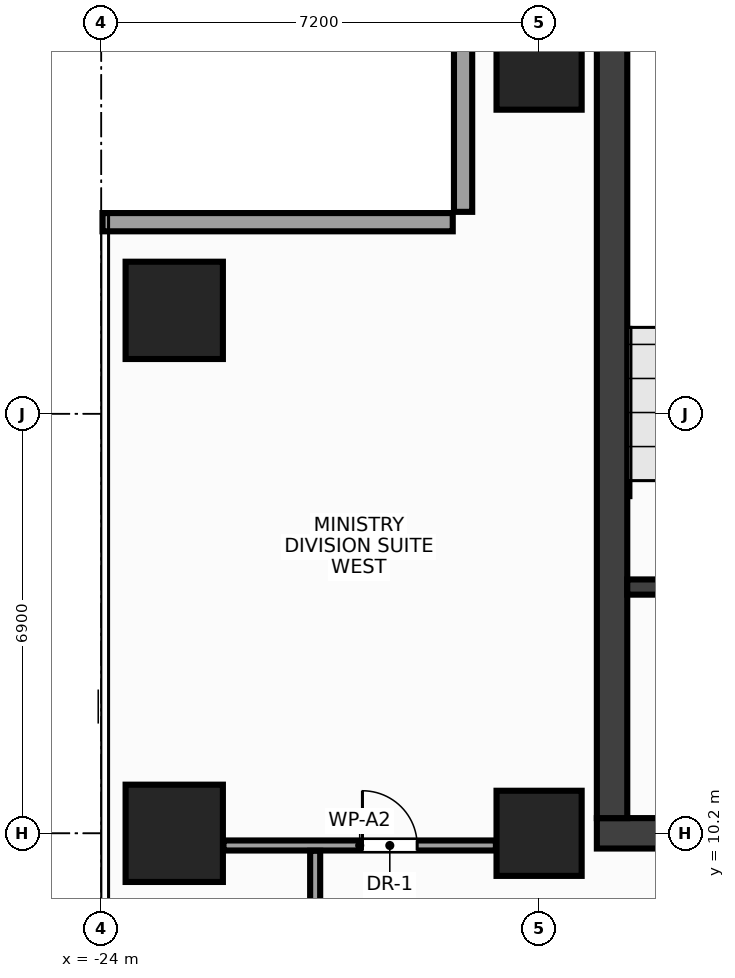
"""IFC4 building model, lengths in metres.
Left out: names, types, materials, properties, quantities, classifications, styles, units other than length and angle.
Written with IfcOpenShell. Run it as: python <this file> out.ifc"""

import sys

from ifc_helpers import new_model, si_unit, direction, frame, frame_2d, origin, origin_2d, place, context, subcontext, project, spatial, rectangle, extrude, source, transform, mapped, element, fill, save


model = new_model("IFC4")
c1 = context("Model", 3, precision=1e-05, world=origin(), true_north=direction((0.0, 1.0)))
c2 = subcontext(c1, "Body", "Model", "MODEL_VIEW")
j1 = project(units=[si_unit("LENGTHUNIT", "METRE"), si_unit("PLANEANGLEUNIT", "RADIAN")], contexts=[c1])
p1 = place(None, origin())
s1 = spatial("IfcSite", under=j1, at=p1, CompositionType="ELEMENT")
p2 = place(p1, origin())
s2 = spatial("IfcBuilding", under=s1, at=p2, CompositionType="ELEMENT")
p3 = place(p2, frame((0.0, 0.0, 221.6)))
s3 = spatial("IfcBuildingStorey", under=s2, at=p3, CompositionType="ELEMENT", Elevation=221.6)
m1 = source(origin(), c2, "Body", "SweptSolid", [
    extrude(rectangle(XDim=31.7, YDim=0.5, at=frame_2d((15.85, 0.0))), origin(), (0.0, 0.0, 1.0), 3.6),
])
p4 = place(p3, frame((-15.85, 10.2, 0.0), z_axis=(0.0, 0.0, 1.0), x_axis=(1.0, 0.0, 0.0)))
e1 = element("IfcWall", 1, at=p4, inside=s3, PredefinedType="SHEAR", context=c2, shape_type="MappedRepresentation", body=[
    mapped(m1, transform((0.0, 0.0, 0.0), x_axis=(1.0, 0.0, 0.0), y_axis=(0.0, 1.0, 0.0), z_axis=(0.0, 0.0, 1.0), scale=1.0)),
])
p5 = place(p4, frame((1.7, 0.0, 0.0)))
e2 = element("IfcOpeningElement", 2, at=p5, cuts=e1, PredefinedType="OPENING", context=c2, shape_type="SweptSolid", body=[
    extrude(rectangle(XDim=1.6, YDim=2.15, at=frame_2d((0.8, 1.075))), frame((0.0, 0.262, 0.0), z_axis=(0.0, -1.0, 0.0), x_axis=(1.0, 0.0, 0.0)), (0.0, 0.0, 1.0), 0.524),
])
p6 = place(p4, frame((28.4, 0.0, 0.0)))
e3 = element("IfcOpeningElement", 3, at=p6, cuts=e1, PredefinedType="OPENING", context=c2, shape_type="SweptSolid", body=[
    extrude(rectangle(XDim=1.6, YDim=2.15, at=frame_2d((0.8, 1.075))), frame((0.0, 0.262, 0.0), z_axis=(0.0, -1.0, 0.0), x_axis=(1.0, 0.0, 0.0)), (0.0, 0.0, 1.0), 0.524),
])
p7 = place(p4, frame((15.1, 0.0, 0.0)))
e4 = element("IfcOpeningElement", 4, at=p7, cuts=e1, PredefinedType="OPENING", context=c2, shape_type="SweptSolid", body=[
    extrude(rectangle(XDim=1.5, YDim=2.2, at=frame_2d((0.75, 1.1))), frame((0.0, 0.262, 0.0), z_axis=(0.0, -1.0, 0.0), x_axis=(1.0, 0.0, 0.0)), (0.0, 0.0, 1.0), 0.524),
])
m2 = source(origin(), c2, "Body", "SweptSolid", [
    extrude(rectangle(XDim=13.1, YDim=0.5, at=frame_2d((6.55, 0.0))), origin(), (0.0, 0.0, 1.0), 3.6),
])
p8 = place(p3, frame((-15.6, 10.45, 0.0), z_axis=(0.0, 0.0, 1.0), x_axis=(0.0, 1.0, 0.0)))
e5 = element("IfcWall", 5, at=p8, inside=s3, PredefinedType="SHEAR", context=c2, shape_type="MappedRepresentation", body=[
    mapped(m2, transform((0.0, 0.0, 0.0), x_axis=(1.0, 0.0, 0.0), y_axis=(0.0, 1.0, 0.0), z_axis=(0.0, 0.0, 1.0), scale=1.0)),
])
m3 = source(origin(), c2, "Body", "SweptSolid", [
    extrude(rectangle(XDim=3.705, YDim=0.25, at=frame_2d((1.853, 0.0))), origin(), (0.0, 0.0, 1.0), 3.6),
])
p9 = place(p3, frame((-15.35, 14.25, 0.0), z_axis=(0.0, 0.0, 1.0), x_axis=(1.0, 0.0, 0.0)))
e6 = element("IfcWall", 6, at=p9, inside=s3, PredefinedType="SHEAR", context=c2, shape_type="MappedRepresentation", body=[
    mapped(m3, transform((0.0, 0.0, 0.0), x_axis=(1.0, 0.0, 0.0), y_axis=(0.0, 1.0, 0.0), z_axis=(0.0, 0.0, 1.0), scale=1.0)),
])
p10 = place(p9, frame((0.95, 0.0, 0.0)))
e7 = element("IfcOpeningElement", 7, at=p10, cuts=e6, PredefinedType="OPENING", context=c2, shape_type="SweptSolid", body=[
    extrude(rectangle(XDim=1.6, YDim=2.15, at=frame_2d((0.8, 1.075))), frame((0.0, 0.137, 0.0), z_axis=(0.0, -1.0, 0.0), x_axis=(1.0, 0.0, 0.0)), (0.0, 0.0, 1.0), 0.274),
])
m4 = source(origin(), c2, "Body", "SweptSolid", [
    extrude(rectangle(XDim=1.4, YDim=1.4, at=origin_2d()), origin(), (0.0, 0.0, 1.0), 3.6),
])
for number, where, z_axis, x_axis in (
    (8, (-16.8, 10.2, 0.0), (0.0, 0.0, 1.0), (1.0, 0.0, 0.0)),
    (9, (-16.8, 22.8, 0.0), (0.0, 0.0, 1.0), (1.0, 0.0, 0.0)),
):
    element("IfcColumn", number, at=place(p3, frame(where, z_axis=z_axis, x_axis=x_axis)), inside=s3, PredefinedType="COLUMN", context=c2, shape_type="MappedRepresentation", body=[
        mapped(m4, transform((0.0, 0.0, 0.0), x_axis=(1.0, 0.0, 0.0), y_axis=(0.0, 1.0, 0.0), z_axis=(0.0, 0.0, 1.0), scale=1.0)),
    ])
m5 = source(origin(), c2, "Body", "SweptSolid", [
    extrude(rectangle(XDim=1.6, YDim=1.6, at=origin_2d()), origin(), (0.0, 0.0, 1.0), 3.6),
])
for number, where, z_axis, x_axis in (
    (10, (-22.8, 10.2, 0.0), (0.0, 0.0, 1.0), (1.0, 0.0, 0.0)),
    (11, (-22.8, 18.8, 0.0), (0.0, 0.0, 1.0), (1.0, 0.0, 0.0)),
):
    element("IfcColumn", number, at=place(p3, frame(where, z_axis=z_axis, x_axis=x_axis)), inside=s3, PredefinedType="COLUMN", context=c2, shape_type="MappedRepresentation", body=[
        mapped(m5, transform((0.0, 0.0, 0.0), x_axis=(1.0, 0.0, 0.0), y_axis=(0.0, 1.0, 0.0), z_axis=(0.0, 0.0, 1.0), scale=1.0)),
    ])
m6 = source(origin(), c2, "Body", "SweptSolid", [
    extrude(rectangle(XDim=3.56, YDim=0.3, at=frame_2d((1.78, 0.0))), origin(), (0.0, 0.0, 1.0), 2.76),
])
p11 = place(p3, frame((-18.05, 23.98, 0.0), z_axis=(0.0, 0.0, 1.0), x_axis=(0.0, -1.0, 0.0)))
e12 = element("IfcWall", 12, at=p11, inside=s3, PredefinedType="STANDARD", context=c2, shape_type="MappedRepresentation", body=[
    mapped(m6, transform((0.0, 0.0, 0.0), x_axis=(1.0, 0.0, 0.0), y_axis=(0.0, 1.0, 0.0), z_axis=(0.0, 0.0, 1.0), scale=1.0)),
])
m7 = source(origin(), c2, "Body", "SweptSolid", [
    extrude(rectangle(XDim=5.76, YDim=0.3, at=frame_2d((2.88, 0.0))), origin(), (0.0, 0.0, 1.0), 2.76),
])
p12 = place(p3, frame((-18.22, 20.25, 0.0), z_axis=(0.0, 0.0, 1.0), x_axis=(-1.0, 0.0, 0.0)))
e13 = element("IfcWall", 13, at=p12, inside=s3, PredefinedType="STANDARD", context=c2, shape_type="MappedRepresentation", body=[
    mapped(m7, transform((0.0, 0.0, 0.0), x_axis=(1.0, 0.0, 0.0), y_axis=(0.0, 1.0, 0.0), z_axis=(0.0, 0.0, 1.0), scale=1.0)),
])
m8 = source(origin(), c2, "Body", "SweptSolid", [
    extrude(rectangle(XDim=4.48, YDim=0.165, at=frame_2d((2.24, 0.0))), origin(), (0.0, 0.0, 1.0), 2.915),
])
p13 = place(p3, frame((-21.99, 10.0, 0.0), z_axis=(0.0, 0.0, 1.0), x_axis=(1.0, 0.0, 0.0)))
e14 = element("IfcWall", 14, at=p13, inside=s3, PredefinedType="PARTITIONING", context=c2, shape_type="MappedRepresentation", body=[
    mapped(m8, transform((0.0, 0.0, 0.0), x_axis=(1.0, 0.0, 0.0), y_axis=(0.0, 1.0, 0.0), z_axis=(0.0, 0.0, 1.0), scale=1.0)),
])
p14 = place(p13, frame((2.285, 0.0, 0.0)))
e15 = element("IfcOpeningElement", 15, at=p14, cuts=e14, PredefinedType="OPENING", context=c2, shape_type="SweptSolid", body=[
    extrude(rectangle(XDim=0.9, YDim=2.15, at=frame_2d((0.45, 1.075))), frame((0.0, 0.094, 0.0), z_axis=(0.0, -1.0, 0.0), x_axis=(1.0, 0.0, 0.0)), (0.0, 0.0, 1.0), 0.189),
])
m9 = source(origin(), c2, "Body", "SweptSolid", [
    extrude(rectangle(XDim=2.358, YDim=0.165, at=frame_2d((1.179, 0.0))), origin(), (0.0, 0.0, 1.0), 3.38),
])
p15 = place(p3, frame((-20.482, 7.555, 0.0), z_axis=(0.0, 0.0, 1.0), x_axis=(0.0, 1.0, 0.0)))
e16 = element("IfcWall", 16, at=p15, inside=s3, PredefinedType="PARTITIONING", context=c2, shape_type="MappedRepresentation", body=[
    mapped(m9, transform((0.0, 0.0, 0.0), x_axis=(1.0, 0.0, 0.0), y_axis=(0.0, 1.0, 0.0), z_axis=(0.0, 0.0, 1.0), scale=1.0)),
])
m10 = source(origin(), c2, "Body", "SweptSolid", [
    extrude(rectangle(XDim=0.9, YDim=2.15, at=frame_2d((0.45, 1.075))), frame((0.0, 0.025, 0.0), z_axis=(0.0, -1.0, 0.0), x_axis=(1.0, 0.0, 0.0)), (0.0, 0.0, 1.0), 0.05),
])
p16 = place(p14, origin())
e17 = element("IfcDoor", 17, at=p16, inside=s3, OperationType="SINGLE_SWING_LEFT", PredefinedType="DOOR", context=c2, shape_type="MappedRepresentation", body=[
    mapped(m10, transform((0.0, 0.0, 0.0), x_axis=(1.0, 0.0, 0.0), y_axis=(0.0, 1.0, 0.0), z_axis=(0.0, 0.0, 1.0), scale=1.0)),
])
fill(e15, e17)
save(model, sys.argv[1])
